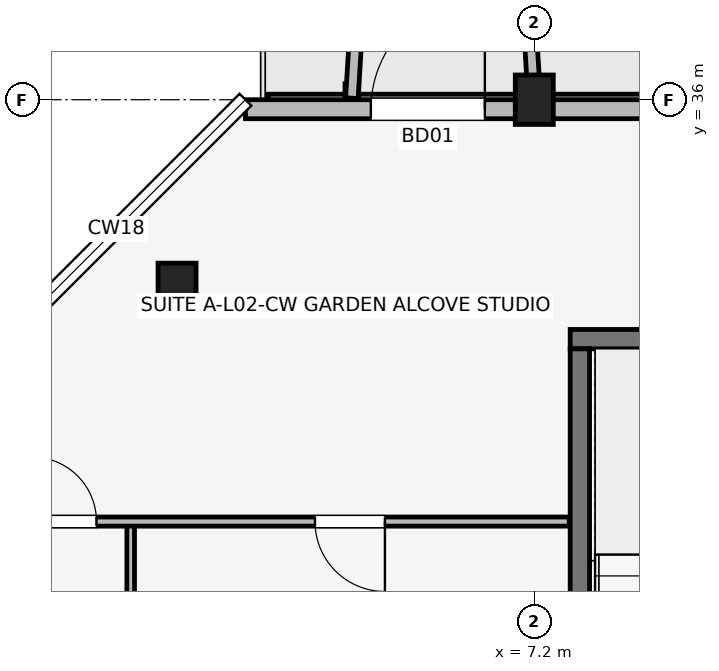
"""IFC4 building model, lengths in metres.
Left out: names, types, materials, properties, quantities, classifications, styles, units other than length and angle.
Written with IfcOpenShell. Run it as: python <this file> out.ifc"""

import sys

from ifc_helpers import new_model, si_unit, direction, frame, frame_2d, origin, origin_2d, place, context, subcontext, project, spatial, rectangle, extrude, element, fill, save


model = new_model("IFC4")
c1 = context("Model", 3, precision=1e-05, world=origin(), true_north=direction((0.0, 1.0)))
c2 = subcontext(c1, "Body", "Model", "MODEL_VIEW")
j1 = project(units=[si_unit("LENGTHUNIT", "METRE"), si_unit("PLANEANGLEUNIT", "RADIAN")], contexts=[c1])
p1 = place(None, origin())
s1 = spatial("IfcSite", under=j1, at=p1, CompositionType="ELEMENT")
p2 = place(p1, origin())
s2 = spatial("IfcBuilding", under=s1, at=p2, CompositionType="ELEMENT")
p3 = place(p2, frame((0.0, 0.0, 8.7)))
s3 = spatial("IfcBuildingStorey", under=s2, at=p3, CompositionType="ELEMENT", Elevation=8.7)
p4 = place(p3, frame((2.5, 33.5, 0.0), z_axis=(0.0, 0.0, 1.0), x_axis=(1.0, 0.0, 0.0)))
e1 = element("IfcColumn", 1, at=p4, inside=s3, PredefinedType="COLUMN", context=c2, shape_type="SweptSolid", body=[
    extrude(rectangle(XDim=0.5, YDim=0.7, at=origin_2d()), origin(), (0.0, 0.0, 1.0), 3.15),
])
p5 = place(p3, frame((7.2, 36.0, 0.0), z_axis=(0.0, 0.0, 1.0), x_axis=(1.0, 0.0, 0.0)))
e2 = element("IfcColumn", 2, at=p5, inside=s3, PredefinedType="COLUMN", context=c2, shape_type="SweptSolid", body=[
    extrude(rectangle(XDim=0.5, YDim=0.65, at=origin_2d()), origin(), (0.0, 0.0, 1.0), 3.15),
])
p6 = place(p3, frame((7.673, 32.85, 0.0), z_axis=(0.0, 0.0, 1.0), x_axis=(1.0, 0.0, 0.0)))
e3 = element("IfcWall", 3, at=p6, inside=s3, PredefinedType="SHEAR", context=c2, shape_type="SweptSolid", body=[
    extrude(rectangle(XDim=3.305, YDim=0.255, at=frame_2d((1.652, 0.0))), origin(), (0.0, 0.0, 1.0), 3.15),
])
p7 = place(p3, frame((7.8, 26.427, 0.0), z_axis=(0.0, 0.0, 1.0), x_axis=(0.0, 1.0, 0.0)))
e4 = element("IfcWall", 4, at=p7, inside=s3, PredefinedType="SHEAR", context=c2, shape_type="SweptSolid", body=[
    extrude(rectangle(XDim=6.295, YDim=0.255, at=frame_2d((3.147, 0.0))), origin(), (0.0, 0.0, 1.0), 3.15),
])
p8 = place(p3, frame((32.6, 35.875, 0.0), z_axis=(0.0, 0.0, 1.0), x_axis=(-1.0, 0.0, 0.0)))
e5 = element("IfcWall", 5, at=p8, inside=s3, PredefinedType="SOLIDWALL", context=c2, shape_type="SweptSolid", body=[
    extrude(rectangle(XDim=29.2, YDim=0.25, at=frame_2d((14.6, 0.0))), origin(), (0.0, 0.0, 1.0), 2.43),
])
p9 = place(p8, frame((27.55, 0.0, 0.0), z_axis=(0.0, 0.0, 1.0), x_axis=(-1.0, 0.0, 0.0)))
e6 = element("IfcOpeningElement", 6, at=p9, cuts=e5, PredefinedType="OPENING", context=c2, shape_type="SweptSolid", body=[
    extrude(rectangle(XDim=1.5, YDim=2.15, at=frame_2d((0.75, 1.075))), frame((0.0, 0.135, 0.0), z_axis=(0.0, -1.0, 0.0), x_axis=(1.0, 0.0, 0.0)), (0.0, 0.0, 1.0), 0.27),
])
p10 = place(p8, frame((3.15, 0.0, 0.0), z_axis=(0.0, 0.0, 1.0), x_axis=(-1.0, 0.0, 0.0)))
e7 = element("IfcOpeningElement", 7, at=p10, cuts=e5, PredefinedType="OPENING", context=c2, shape_type="SweptSolid", body=[
    extrude(rectangle(XDim=1.5, YDim=2.15, at=frame_2d((0.75, 1.075))), frame((0.0, 0.135, 0.0), z_axis=(0.0, -1.0, 0.0), x_axis=(1.0, 0.0, 0.0)), (0.0, 0.0, 1.0), 0.27),
])
p11 = place(p8, frame((14.025, 0.0, 0.5)))
e8 = element("IfcOpeningElement", 8, at=p11, cuts=e5, PredefinedType="OPENING", context=c2, shape_type="SweptSolid", body=[
    extrude(rectangle(XDim=1.15, YDim=1.68, at=frame_2d((0.575, 0.84))), frame((0.0, 0.135, 0.0), z_axis=(0.0, -1.0, 0.0), x_axis=(1.0, 0.0, 0.0)), (0.0, 0.0, 1.0), 0.27),
])
p12 = place(p8, frame((8.725, 0.0, 0.7)))
e9 = element("IfcOpeningElement", 9, at=p12, cuts=e5, PredefinedType="OPENING", context=c2, shape_type="SweptSolid", body=[
    extrude(rectangle(XDim=1.86, YDim=1.6, at=frame_2d((0.93, 0.8))), frame((0.0, 0.135, 0.0), z_axis=(0.0, -1.0, 0.0), x_axis=(1.0, 0.0, 0.0)), (0.0, 0.0, 1.0), 0.27),
])
p13 = place(p8, frame((18.615, 0.0, 0.7)))
e10 = element("IfcOpeningElement", 10, at=p13, cuts=e5, PredefinedType="OPENING", context=c2, shape_type="SweptSolid", body=[
    extrude(rectangle(XDim=1.86, YDim=1.6, at=frame_2d((0.93, 0.8))), frame((0.0, 0.135, 0.0), z_axis=(0.0, -1.0, 0.0), x_axis=(1.0, 0.0, 0.0)), (0.0, 0.0, 1.0), 0.27),
])
for number, where, z_axis, x_axis in (
    (11, (4.8, 36.02, 0.0), (0.0, 0.0, 1.0), (0.061, 0.998, 0.0)),
    (12, (7.2, 36.02, 0.0), (0.0, 0.0, 1.0), (-0.061, 0.998, 0.0)),
):
    element("IfcWall", number, at=place(p3, frame(where, z_axis=z_axis, x_axis=x_axis)), inside=s3, PredefinedType="ELEMENTEDWALL", context=c2, shape_type="SweptSolid", body=[
        extrude(rectangle(XDim=1.964, YDim=0.165, at=frame_2d((0.982, 0.0))), origin(), (0.0, 0.0, 1.0), 2.95),
    ])
p14 = place(p3, frame((1.89, 26.1, 0.0), z_axis=(0.0, 0.0, 1.0), x_axis=(0.0, 1.0, 0.0)))
e13 = element("IfcWall", 13, at=p14, inside=s3, PredefinedType="PARTITIONING", context=c2, shape_type="SweptSolid", body=[
    extrude(rectangle(XDim=4.35, YDim=0.1, at=frame_2d((2.175, 0.0))), origin(), (0.0, 0.0, 1.0), 2.375),
])
p15 = place(p3, frame((0.14, 30.45, 0.0), z_axis=(0.0, 0.0, 1.0), x_axis=(1.0, 0.0, 0.0)))
e14 = element("IfcWall", 14, at=p15, inside=s3, PredefinedType="PARTITIONING", context=c2, shape_type="SweptSolid", body=[
    extrude(rectangle(XDim=7.52, YDim=0.12, at=frame_2d((3.76, 0.0))), origin(), (0.0, 0.0, 1.0), 2.38),
])
p16 = place(p15, frame((0.45, 0.0, 0.0)))
e15 = element("IfcOpeningElement", 15, at=p16, cuts=e14, PredefinedType="OPENING", context=c2, shape_type="SweptSolid", body=[
    extrude(rectangle(XDim=0.85, YDim=2.08, at=frame_2d((0.425, 1.04))), frame((0.0, 0.07, 0.0), z_axis=(0.0, -1.0, 0.0), x_axis=(1.0, 0.0, 0.0)), (0.0, 0.0, 1.0), 0.14),
])
p17 = place(p15, frame((5.095, 0.0, 0.0), z_axis=(0.0, 0.0, 1.0), x_axis=(-1.0, 0.0, 0.0)))
e16 = element("IfcOpeningElement", 16, at=p17, cuts=e14, PredefinedType="OPENING", context=c2, shape_type="SweptSolid", body=[
    extrude(rectangle(XDim=0.92, YDim=2.08, at=frame_2d((0.46, 1.04))), frame((0.0, 0.07, 0.0), z_axis=(0.0, -1.0, 0.0), x_axis=(1.0, 0.0, 0.0)), (0.0, 0.0, 1.0), 0.14),
])
p18 = place(p9, origin())
e17 = element("IfcDoor", 17, at=p18, inside=s3, OperationType="SINGLE_SWING_LEFT", PredefinedType="DOOR", context=c2, shape_type="SweptSolid", body=[
    extrude(rectangle(XDim=1.5, YDim=2.15, at=frame_2d((0.75, 1.075))), frame((0.0, 0.025, 0.0), z_axis=(0.0, -1.0, 0.0), x_axis=(1.0, 0.0, 0.0)), (0.0, 0.0, 1.0), 0.05),
])
fill(e6, e17)
p19 = place(p16, origin())
e18 = element("IfcDoor", 18, at=p19, inside=s3, OperationType="SINGLE_SWING_LEFT", PredefinedType="DOOR", context=c2, shape_type="SweptSolid", body=[
    extrude(rectangle(XDim=0.85, YDim=2.08, at=frame_2d((0.425, 1.04))), frame((0.0, 0.025, 0.0), z_axis=(0.0, -1.0, 0.0), x_axis=(1.0, 0.0, 0.0)), (0.0, 0.0, 1.0), 0.05),
])
fill(e15, e18)
p20 = place(p17, origin())
e19 = element("IfcDoor", 19, at=p20, inside=s3, OperationType="SINGLE_SWING_RIGHT", PredefinedType="DOOR", context=c2, shape_type="SweptSolid", body=[
    extrude(rectangle(XDim=0.92, YDim=2.08, at=frame_2d((0.46, 1.04))), frame((0.0, 0.025, 0.0), z_axis=(0.0, -1.0, 0.0), x_axis=(1.0, 0.0, 0.0)), (0.0, 0.0, 1.0), 0.05),
])
fill(e16, e19)
save(model, sys.argv[1])
